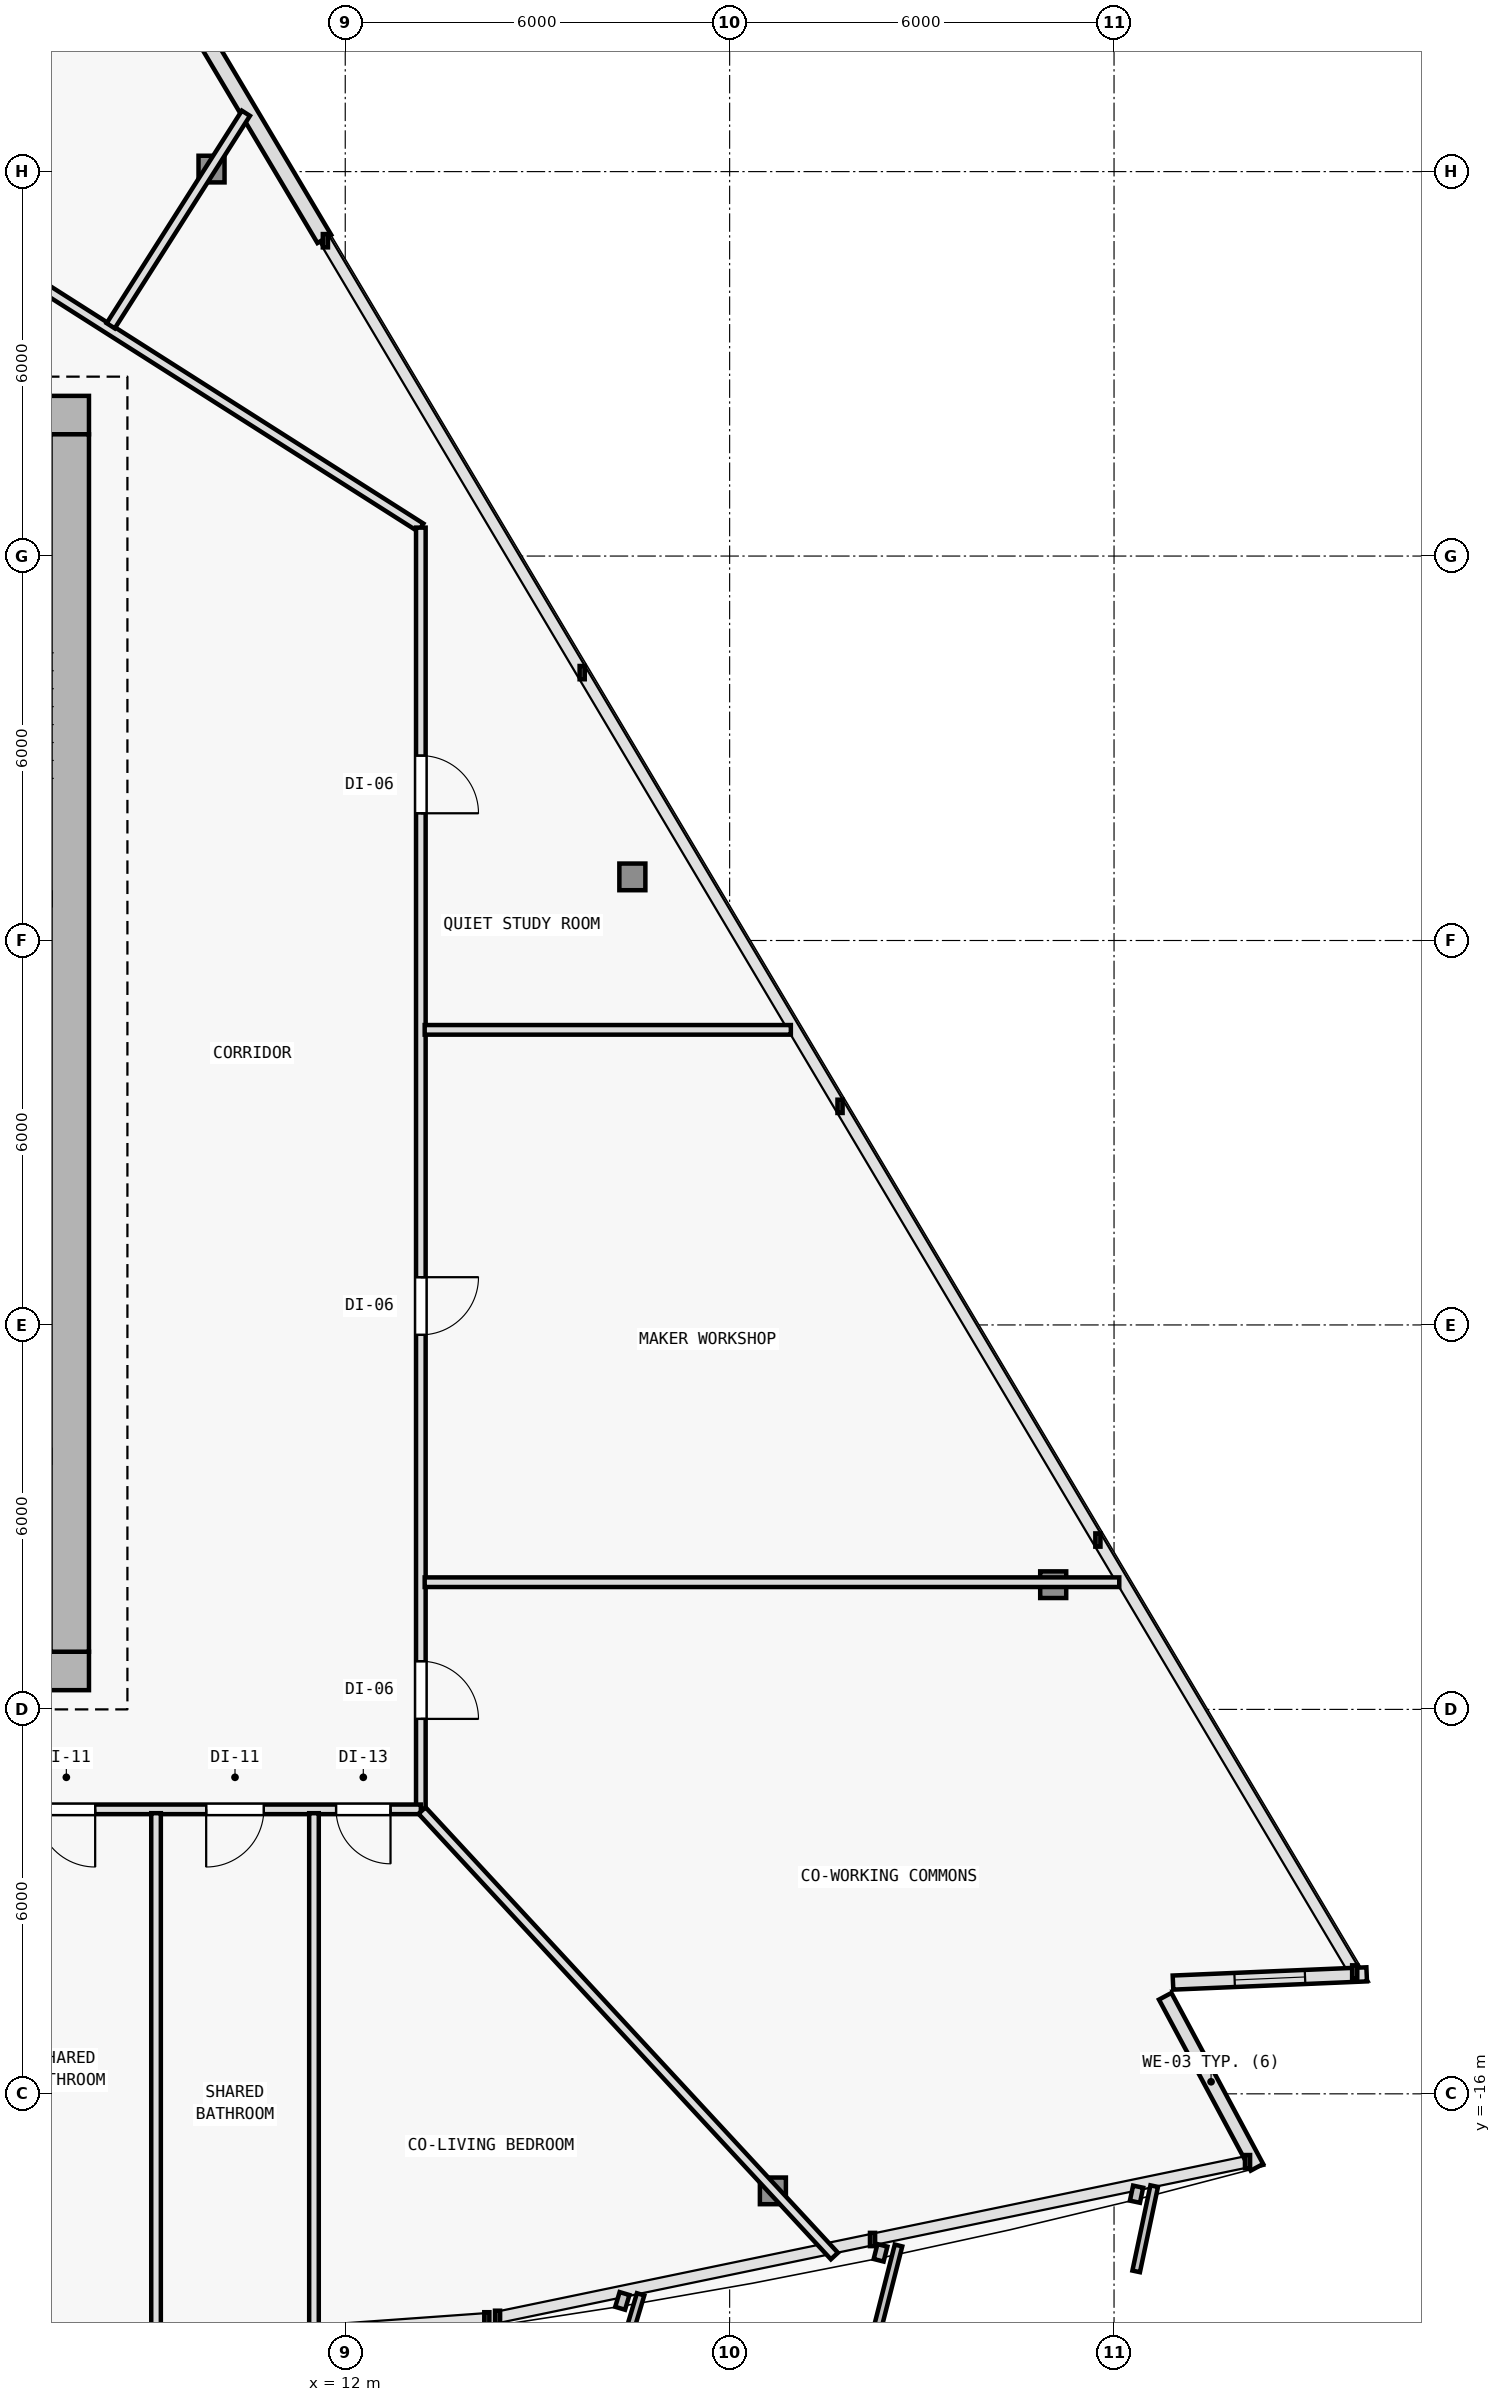
"""IFC4 building model, lengths in metres.
Left out: names, types, materials, properties, quantities, classifications, styles, units other than length and angle.
Written with IfcOpenShell. Run it as: python <this file> out.ifc"""

import sys

from ifc_helpers import new_model, si_unit, direction, frame, frame_2d, origin, origin_2d, place, context, subcontext, project, spatial, rectangle, i_section, extrude, element, fill, save


model = new_model("IFC4")
c1 = context("Model", 3, precision=1e-05, world=origin(), true_north=direction((0.0, 1.0)))
c2 = subcontext(c1, "Body", "Model", "MODEL_VIEW")
j1 = project(units=[si_unit("LENGTHUNIT", "METRE"), si_unit("PLANEANGLEUNIT", "RADIAN")], contexts=[c1])
p1 = place(None, origin())
s1 = spatial("IfcSite", under=j1, at=p1, CompositionType="ELEMENT")
p2 = place(p1, origin())
s2 = spatial("IfcBuilding", under=s1, at=p2, CompositionType="ELEMENT")
p3 = place(p2, frame((0.0, 0.0, 111.3)))
s3 = spatial("IfcBuildingStorey", under=s2, at=p3, CompositionType="ELEMENT", Elevation=111.3)
for number, where, z_axis, x_axis in (
    (1, (7.7, -9.4, 0.0), (0.0, 0.0, 1.0), (1.0, 0.0, 0.0)),
    (2, (7.7, 10.2, 0.0), (0.0, 0.0, 1.0), (1.0, 0.0, 0.0)),
    (3, (7.7, 0.4, 0.0), (0.0, 0.0, 1.0), (1.0, 0.0, 0.0)),
):
    element("IfcColumn", number, at=place(p3, frame(where, z_axis=z_axis, x_axis=x_axis)), inside=s3, PredefinedType="COLUMN", context=c2, shape_type="SweptSolid", body=[
        extrude(i_section(OverallWidth=0.409, OverallDepth=0.425, WebThickness=0.021, FlangeThickness=0.034, FilletRadius=0.015, at=origin_2d()), origin(), (0.0, 0.0, 1.0), 3.6),
    ])
p4 = place(p3, frame((18.675, -17.514, 0.005), z_axis=(-0.020594847032, 0.03357707734, 0.999223914922), x_axis=(-0.852427604955, -0.522845271865, 0.0)))
e4 = element("IfcColumn", 4, at=p4, inside=s3, PredefinedType="COLUMN", context=c2, shape_type="SweptSolid", body=[
    extrude(i_section(OverallWidth=0.406, OverallDepth=0.416, WebThickness=0.019, FlangeThickness=0.031, FilletRadius=0.015, at=origin_2d()), origin(), (0.0, 0.0, 1.0), 3.592),
])
p5 = place(p3, frame((23.05, -8.054, 0.005), z_axis=(-0.026037725696, 0.021618790526, 0.9994271683), x_axis=(-0.638800249892, -0.769372628015, 0.0)))
e5 = element("IfcColumn", 5, at=p5, inside=s3, PredefinedType="COLUMN", context=c2, shape_type="SweptSolid", body=[
    extrude(i_section(OverallWidth=0.406, OverallDepth=0.416, WebThickness=0.019, FlangeThickness=0.031, FilletRadius=0.015, at=origin_2d()), origin(), (0.0, 0.0, 1.0), 3.591),
])
p6 = place(p3, frame((16.482, 2.993, 0.005), z_axis=(-0.018906041, 0.009521027842, 0.999775930718), x_axis=(-0.449781931574, -0.893138406984, 0.0)))
e6 = element("IfcColumn", 6, at=p6, inside=s3, PredefinedType="COLUMN", context=c2, shape_type="SweptSolid", body=[
    extrude(i_section(OverallWidth=0.406, OverallDepth=0.416, WebThickness=0.019, FlangeThickness=0.031, FilletRadius=0.015, at=origin_2d()), origin(), (0.0, 0.0, 1.0), 3.59),
])
p7 = place(p3, frame((9.913, 14.04, 0.005), z_axis=(-0.011767052893, -0.002584670578, 0.999927425339), x_axis=(0.214538664031, -0.976715496773, 0.0)))
e7 = element("IfcColumn", 7, at=p7, inside=s3, PredefinedType="COLUMN", context=c2, shape_type="SweptSolid", body=[
    extrude(i_section(OverallWidth=0.406, OverallDepth=0.416, WebThickness=0.019, FlangeThickness=0.031, FilletRadius=0.015, at=origin_2d()), origin(), (0.0, 0.0, 1.0), 3.589),
])
p8 = place(p3, frame((6.017, 22.462, 0.0), z_axis=(0.0, 0.0, 1.0), x_axis=(0.511085523564, -0.859529864288, 0.0)))
e8 = element("IfcWall", 8, at=p8, inside=s3, PredefinedType="SOLIDWALL", context=c2, shape_type="SweptSolid", body=[
    extrude(rectangle(XDim=11.068, YDim=0.25, at=frame_2d((5.534, 0.0))), origin(), (0.0, 0.0, 1.0), 3.35),
])
p9 = place(p8, frame((4.984, 0.0, 0.62)))
e9 = element("IfcOpeningElement", 9, at=p9, cuts=e8, PredefinedType="OPENING", context=c2, shape_type="SweptSolid", body=[
    extrude(rectangle(XDim=1.1, YDim=1.8, at=frame_2d((0.55, 0.9))), frame((0.0, 0.135, 0.0), z_axis=(0.0, -1.0, 0.0), x_axis=(1.0, 0.0, 0.0)), (0.0, 0.0, 1.0), 0.27),
])
p10 = place(p3, frame((24.798, -14.477, 0.0), z_axis=(0.0, 0.0, 1.0), x_axis=(0.472820757697, -0.881158629925, 0.0)))
e10 = element("IfcWall", 10, at=p10, inside=s3, PredefinedType="SOLIDWALL", context=c2, shape_type="SweptSolid", body=[
    extrude(rectangle(XDim=3.029, YDim=0.22, at=frame_2d((1.514, 0.0))), origin(), (0.0, 0.0, 1.0), 3.35),
])
p11 = place(p3, frame((27.943, -14.135, 0.0), z_axis=(0.0, 0.0, 1.0), x_axis=(-0.999095621918, -0.042519857284, 0.0)))
e11 = element("IfcWall", 11, at=p11, inside=s3, PredefinedType="SOLIDWALL", context=c2, shape_type="SweptSolid", body=[
    extrude(rectangle(XDim=3.026, YDim=0.22, at=frame_2d((1.513, 0.0))), origin(), (0.0, 0.0, 1.0), 3.35),
])
p12 = place(p11, frame((0.963, 0.0, 0.62)))
e12 = element("IfcOpeningElement", 12, at=p12, cuts=e11, PredefinedType="OPENING", context=c2, shape_type="SweptSolid", body=[
    extrude(rectangle(XDim=1.1, YDim=1.8, at=frame_2d((0.55, 0.9))), frame((0.0, 0.12, 0.0), z_axis=(0.0, -1.0, 0.0), x_axis=(1.0, 0.0, 0.0)), (0.0, 0.0, 1.0), 0.24),
])
p13 = place(p3, frame((-8.0, -9.4, 0.0), z_axis=(0.0, 0.0, 1.0), x_axis=(1.0, 0.0, 0.0)))
e13 = element("IfcWall", 13, at=p13, inside=s3, PredefinedType="SHEAR", context=c2, shape_type="SweptSolid", body=[
    extrude(rectangle(XDim=16.0, YDim=0.6, at=frame_2d((8.0, 0.0))), origin(), (0.0, 0.0, 1.0), 3.35),
])
p14 = place(p13, frame((9.65, 0.0, 0.0)))
e14 = element("IfcOpeningElement", 14, at=p14, cuts=e13, PredefinedType="OPENING", context=c2, shape_type="SweptSolid", body=[
    extrude(rectangle(XDim=1.5, YDim=2.2, at=frame_2d((0.75, 1.1))), frame((0.0, 0.31, 0.0), z_axis=(0.0, -1.0, 0.0), x_axis=(1.0, 0.0, 0.0)), (0.0, 0.0, 1.0), 0.62),
])
p15 = place(p3, frame((8.0, 10.2, 0.0), z_axis=(0.0, 0.0, 1.0), x_axis=(-1.0, 0.0, 0.0)))
e15 = element("IfcWall", 15, at=p15, inside=s3, PredefinedType="SHEAR", context=c2, shape_type="SweptSolid", body=[
    extrude(rectangle(XDim=16.0, YDim=0.6, at=frame_2d((8.0, 0.0))), origin(), (0.0, 0.0, 1.0), 3.35),
])
p16 = place(p15, frame((4.45, 0.0, 0.0)))
e16 = element("IfcOpeningElement", 16, at=p16, cuts=e15, PredefinedType="OPENING", context=c2, shape_type="SweptSolid", body=[
    extrude(rectangle(XDim=1.1, YDim=2.15, at=frame_2d((0.55, 1.075))), frame((0.0, 0.31, 0.0), z_axis=(0.0, -1.0, 0.0), x_axis=(1.0, 0.0, 0.0)), (0.0, 0.0, 1.0), 0.62),
])
p17 = place(p3, frame((7.7, 9.9, 0.0), z_axis=(0.0, 0.0, 1.0), x_axis=(0.0, -1.0, 0.0)))
e17 = element("IfcWall", 17, at=p17, inside=s3, PredefinedType="SHEAR", context=c2, shape_type="SweptSolid", body=[
    extrude(rectangle(XDim=19.0, YDim=0.6, at=frame_2d((9.5, 0.0))), origin(), (0.0, 0.0, 1.0), 3.35),
])
p18 = place(p3, frame((7.023, 12.36, 0.0), z_axis=(0.0, 0.0, 1.0), x_axis=(0.84376480085, -0.536713108511, 0.0)))
e18 = element("IfcWall", 18, at=p18, inside=s3, PredefinedType="PARTITIONING", context=c2, shape_type="SweptSolid", body=[
    extrude(rectangle(XDim=7.297, YDim=0.15, at=frame_2d((3.648, 0.0))), origin(), (0.0, 0.0, 1.0), 2.725),
])
p19 = place(p3, frame((13.18, 8.444, 0.0), z_axis=(0.0, 0.0, 1.0), x_axis=(0.0, -1.0, 0.0)))
e19 = element("IfcWall", 19, at=p19, inside=s3, PredefinedType="PARTITIONING", context=c2, shape_type="SweptSolid", body=[
    extrude(rectangle(XDim=20.004, YDim=0.15, at=frame_2d((10.002, 0.0))), origin(), (0.0, 0.0, 1.0), 2.705),
])
p20 = place(p19, frame((17.692, 0.0, 0.0)))
e20 = element("IfcOpeningElement", 20, at=p20, cuts=e19, PredefinedType="OPENING", context=c2, shape_type="SweptSolid", body=[
    extrude(rectangle(XDim=0.9, YDim=2.1, at=frame_2d((0.45, 1.05))), frame((0.0, 0.085, 0.0), z_axis=(0.0, -1.0, 0.0), x_axis=(1.0, 0.0, 0.0)), (0.0, 0.0, 1.0), 0.17),
])
p21 = place(p19, frame((11.699, 0.0, 0.0)))
e21 = element("IfcOpeningElement", 21, at=p21, cuts=e19, PredefinedType="OPENING", context=c2, shape_type="SweptSolid", body=[
    extrude(rectangle(XDim=0.9, YDim=2.1, at=frame_2d((0.45, 1.05))), frame((0.0, 0.085, 0.0), z_axis=(0.0, -1.0, 0.0), x_axis=(1.0, 0.0, 0.0)), (0.0, 0.0, 1.0), 0.17),
])
p22 = place(p19, frame((3.558, 0.0, 0.0)))
e22 = element("IfcOpeningElement", 22, at=p22, cuts=e19, PredefinedType="OPENING", context=c2, shape_type="SweptSolid", body=[
    extrude(rectangle(XDim=0.9, YDim=2.1, at=frame_2d((0.45, 1.05))), frame((0.0, 0.085, 0.0), z_axis=(0.0, -1.0, 0.0), x_axis=(1.0, 0.0, 0.0)), (0.0, 0.0, 1.0), 0.17),
])
p23 = place(p3, frame((13.18, -11.56, 0.0), z_axis=(0.0, 0.0, 1.0), x_axis=(-1.0, 0.0, 0.0)))
e23 = element("IfcWall", 23, at=p23, inside=s3, PredefinedType="PARTITIONING", context=c2, shape_type="SweptSolid", body=[
    extrude(rectangle(XDim=23.04, YDim=0.15, at=frame_2d((11.52, 0.0))), origin(), (0.0, 0.0, 1.0), 2.775),
])
p24 = place(p23, frame((14.448, 0.0, 0.0)))
e24 = element("IfcOpeningElement", 24, at=p24, cuts=e23, PredefinedType="OPENING", context=c2, shape_type="SweptSolid", body=[
    extrude(rectangle(XDim=0.9, YDim=2.1, at=frame_2d((0.45, 1.05))), frame((0.0, 0.085, 0.0), z_axis=(0.0, -1.0, 0.0), x_axis=(1.0, 0.0, 0.0)), (0.0, 0.0, 1.0), 0.17),
])
p25 = place(p23, frame((5.083, 0.0, 0.0)))
e25 = element("IfcOpeningElement", 25, at=p25, cuts=e23, PredefinedType="OPENING", context=c2, shape_type="SweptSolid", body=[
    extrude(rectangle(XDim=0.9, YDim=2.1, at=frame_2d((0.45, 1.05))), frame((0.0, 0.085, 0.0), z_axis=(0.0, -1.0, 0.0), x_axis=(1.0, 0.0, 0.0)), (0.0, 0.0, 1.0), 0.17),
])
p26 = place(p23, frame((2.451, 0.0, 0.0)))
e26 = element("IfcOpeningElement", 26, at=p26, cuts=e23, PredefinedType="OPENING", context=c2, shape_type="SweptSolid", body=[
    extrude(rectangle(XDim=0.9, YDim=2.1, at=frame_2d((0.45, 1.05))), frame((0.0, 0.085, 0.0), z_axis=(0.0, -1.0, 0.0), x_axis=(1.0, 0.0, 0.0)), (0.0, 0.0, 1.0), 0.17),
])
p27 = place(p23, frame((0.473, 0.0, 0.0)))
e27 = element("IfcOpeningElement", 27, at=p27, cuts=e23, PredefinedType="OPENING", context=c2, shape_type="SweptSolid", body=[
    extrude(rectangle(XDim=0.85, YDim=2.1, at=frame_2d((0.425, 1.05))), frame((0.0, 0.085, 0.0), z_axis=(0.0, -1.0, 0.0), x_axis=(1.0, 0.0, 0.0)), (0.0, 0.0, 1.0), 0.17),
])
p28 = place(p3, frame((13.199, -11.579, 0.0), z_axis=(0.0, 0.0, 1.0), x_axis=(0.679358186911, -0.733806823269, 0.0)))
e28 = element("IfcWall", 28, at=p28, inside=s3, PredefinedType="PARTITIONING", context=c2, shape_type="SweptSolid", body=[
    extrude(rectangle(XDim=9.474, YDim=0.15, at=frame_2d((4.737, 0.0))), origin(), (0.0, 0.0, 1.0), 2.775),
])
p29 = place(p3, frame((13.24, -8.015, 0.0), z_axis=(0.0, 0.0, 1.0), x_axis=(1.0, 0.0, 0.0)))
e29 = element("IfcWall", 29, at=p29, inside=s3, PredefinedType="PARTITIONING", context=c2, shape_type="SweptSolid", body=[
    extrude(rectangle(XDim=10.841, YDim=0.15, at=frame_2d((5.421, 0.0))), origin(), (0.0, 0.0, 1.0), 2.705),
])
p30 = place(p3, frame((8.339, 11.594, 0.0), z_axis=(0.0, 0.0, 1.0), x_axis=(0.536714739098, 0.843763763642, 0.0)))
e30 = element("IfcWall", 30, at=p30, inside=s3, PredefinedType="PARTITIONING", context=c2, shape_type="SweptSolid", body=[
    extrude(rectangle(XDim=3.931, YDim=0.15, at=frame_2d((1.966, 0.0))), origin(), (0.0, 0.0, 1.0), 2.725),
])
p31 = place(p3, frame((11.512, -11.62, 0.0), z_axis=(0.0, 0.0, 1.0), x_axis=(0.0, -1.0, 0.0)))
e31 = element("IfcWall", 31, at=p31, inside=s3, PredefinedType="PARTITIONING", context=c2, shape_type="SweptSolid", body=[
    extrude(rectangle(XDim=8.192, YDim=0.15, at=frame_2d((4.096, 0.0))), origin(), (0.0, 0.0, 1.0), 2.775),
])
p32 = place(p3, frame((9.047, -11.62, 0.0), z_axis=(0.0, 0.0, 1.0), x_axis=(0.0, -1.0, 0.0)))
e32 = element("IfcWall", 32, at=p32, inside=s3, PredefinedType="PARTITIONING", context=c2, shape_type="SweptSolid", body=[
    extrude(rectangle(XDim=8.446, YDim=0.15, at=frame_2d((4.223, 0.0))), origin(), (0.0, 0.0, 1.0), 2.835),
])
p33 = place(p3, frame((13.24, 0.606, 0.0), z_axis=(0.0, 0.0, 1.0), x_axis=(1.0, 0.0, 0.0)))
e33 = element("IfcWall", 33, at=p33, inside=s3, PredefinedType="PARTITIONING", context=c2, shape_type="SweptSolid", body=[
    extrude(rectangle(XDim=5.715, YDim=0.15, at=frame_2d((2.858, 0.0))), origin(), (0.0, 0.0, 1.0), 2.835),
])
p34 = place(p12, origin())
e34 = element("IfcWindow", 34, at=p34, inside=s3, PartitioningType="SINGLE_PANEL", PredefinedType="WINDOW", context=c2, shape_type="SweptSolid", body=[
    extrude(rectangle(XDim=1.1, YDim=1.8, at=frame_2d((0.55, 0.9))), frame((0.0, 0.03, 0.0), z_axis=(0.0, -1.0, 0.0), x_axis=(1.0, 0.0, 0.0)), (0.0, 0.0, 1.0), 0.06),
])
fill(e12, e34)
p35 = place(p25, origin())
e35 = element("IfcDoor", 35, at=p35, inside=s3, OperationType="SINGLE_SWING_LEFT", PredefinedType="DOOR", context=c2, shape_type="SweptSolid", body=[
    extrude(rectangle(XDim=0.9, YDim=2.1, at=frame_2d((0.45, 1.05))), frame((0.0, 0.025, 0.0), z_axis=(0.0, -1.0, 0.0), x_axis=(1.0, 0.0, 0.0)), (0.0, 0.0, 1.0), 0.05),
])
fill(e25, e35)
p36 = place(p26, origin())
e36 = element("IfcDoor", 36, at=p36, inside=s3, OperationType="SINGLE_SWING_RIGHT", PredefinedType="DOOR", context=c2, shape_type="SweptSolid", body=[
    extrude(rectangle(XDim=0.9, YDim=2.1, at=frame_2d((0.45, 1.05))), frame((0.0, 0.025, 0.0), z_axis=(0.0, -1.0, 0.0), x_axis=(1.0, 0.0, 0.0)), (0.0, 0.0, 1.0), 0.05),
])
fill(e26, e36)
p37 = place(p27, origin())
e37 = element("IfcDoor", 37, at=p37, inside=s3, OperationType="SINGLE_SWING_LEFT", PredefinedType="DOOR", context=c2, shape_type="SweptSolid", body=[
    extrude(rectangle(XDim=0.85, YDim=2.1, at=frame_2d((0.425, 1.05))), frame((0.0, 0.025, 0.0), z_axis=(0.0, -1.0, 0.0), x_axis=(1.0, 0.0, 0.0)), (0.0, 0.0, 1.0), 0.05),
])
fill(e27, e37)
p38 = place(p20, origin())
e38 = element("IfcDoor", 38, at=p38, inside=s3, OperationType="SINGLE_SWING_RIGHT", PredefinedType="DOOR", context=c2, shape_type="SweptSolid", body=[
    extrude(rectangle(XDim=0.9, YDim=2.1, at=frame_2d((0.45, 1.05))), frame((0.0, 0.025, 0.0), z_axis=(0.0, -1.0, 0.0), x_axis=(1.0, 0.0, 0.0)), (0.0, 0.0, 1.0), 0.05),
])
fill(e20, e38)
p39 = place(p21, origin())
e39 = element("IfcDoor", 39, at=p39, inside=s3, OperationType="SINGLE_SWING_LEFT", PredefinedType="DOOR", context=c2, shape_type="SweptSolid", body=[
    extrude(rectangle(XDim=0.9, YDim=2.1, at=frame_2d((0.45, 1.05))), frame((0.0, 0.025, 0.0), z_axis=(0.0, -1.0, 0.0), x_axis=(1.0, 0.0, 0.0)), (0.0, 0.0, 1.0), 0.05),
])
fill(e21, e39)
p40 = place(p22, origin())
e40 = element("IfcDoor", 40, at=p40, inside=s3, OperationType="SINGLE_SWING_RIGHT", PredefinedType="DOOR", context=c2, shape_type="SweptSolid", body=[
    extrude(rectangle(XDim=0.9, YDim=2.1, at=frame_2d((0.45, 1.05))), frame((0.0, 0.025, 0.0), z_axis=(0.0, -1.0, 0.0), x_axis=(1.0, 0.0, 0.0)), (0.0, 0.0, 1.0), 0.05),
])
fill(e22, e40)
save(model, sys.argv[1])
